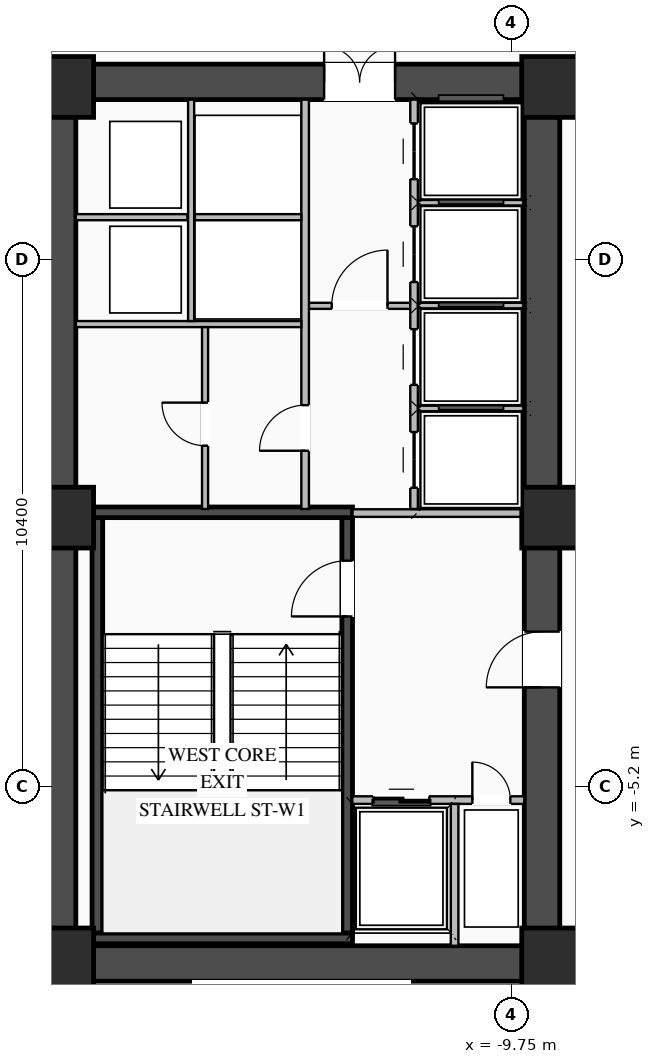
"""IFC4 building model, lengths in metres.
Left out: names, types, materials, properties, quantities, classifications, styles, units other than length and angle.
Written with IfcOpenShell. Run it as: python <this file> out.ifc"""

import sys

from ifc_helpers import new_model, si_unit, direction, frame, frame_2d, origin, origin_2d, place, context, subcontext, project, spatial, rectangle, extrude, element, fill, save


model = new_model("IFC4")
c1 = context("Model", 3, precision=1e-05, world=origin(), true_north=direction((0.0, 1.0)))
c2 = subcontext(c1, "Body", "Model", "MODEL_VIEW")
j1 = project(units=[si_unit("LENGTHUNIT", "METRE"), si_unit("PLANEANGLEUNIT", "RADIAN")], contexts=[c1])
p1 = place(None, origin())
s1 = spatial("IfcSite", under=j1, at=p1, CompositionType="ELEMENT")
p2 = place(p1, origin())
s2 = spatial("IfcBuilding", under=s1, at=p2, CompositionType="ELEMENT")
p3 = place(p2, frame((0.0, 0.0, 18.6)))
s3 = spatial("IfcBuildingStorey", under=s2, at=p3, CompositionType="ELEMENT", Elevation=18.6)
p4 = place(p3, frame((-19.05, -8.7, 0.0), z_axis=(0.0, 0.0, 1.0), x_axis=(1.0, 0.0, 0.0)))
e1 = element("IfcWall", 1, at=p4, inside=s3, PredefinedType="SHEAR", context=c2, shape_type="SweptSolid", body=[
    extrude(rectangle(XDim=10.25, YDim=0.7, at=frame_2d((5.125, 0.0))), origin(), (0.0, 0.0, 1.0), 3.95),
])
p5 = place(p3, frame((-19.05, 8.7, 0.0), z_axis=(0.0, 0.0, 1.0), x_axis=(1.0, 0.0, 0.0)))
e2 = element("IfcWall", 2, at=p5, inside=s3, PredefinedType="SHEAR", context=c2, shape_type="SweptSolid", body=[
    extrude(rectangle(XDim=10.25, YDim=0.7, at=frame_2d((5.125, 0.0))), origin(), (0.0, 0.0, 1.0), 3.95),
])
p6 = place(p5, frame((5.6, 0.0, 0.0)))
e3 = element("IfcOpeningElement", 3, at=p6, cuts=e2, PredefinedType="OPENING", context=c2, shape_type="SweptSolid", body=[
    extrude(rectangle(XDim=1.4, YDim=2.05, at=frame_2d((0.7, 1.025))), frame((0.0, 0.36, 0.0), z_axis=(0.0, -1.0, 0.0), x_axis=(1.0, 0.0, 0.0)), (0.0, 0.0, 1.0), 0.72),
])
p7 = place(p3, frame((-18.7, -8.35, 0.0), z_axis=(0.0, 0.0, 1.0), x_axis=(0.0, 1.0, 0.0)))
e4 = element("IfcWall", 4, at=p7, inside=s3, PredefinedType="SHEAR", context=c2, shape_type="SweptSolid", body=[
    extrude(rectangle(XDim=16.7, YDim=0.7, at=frame_2d((8.35, 0.0))), origin(), (0.0, 0.0, 1.0), 3.95),
])
p8 = place(p3, frame((-9.15, -8.35, 0.0), z_axis=(0.0, 0.0, 1.0), x_axis=(0.0, 1.0, 0.0)))
e5 = element("IfcWall", 5, at=p8, inside=s3, PredefinedType="SHEAR", context=c2, shape_type="SweptSolid", body=[
    extrude(rectangle(XDim=16.7, YDim=0.7, at=frame_2d((8.35, 0.0))), origin(), (0.0, 0.0, 1.0), 3.95),
])
p9 = place(p8, frame((5.1, 0.0, 0.0)))
e6 = element("IfcOpeningElement", 6, at=p9, cuts=e5, PredefinedType="OPENING", context=c2, shape_type="SweptSolid", body=[
    extrude(rectangle(XDim=1.1, YDim=2.08, at=frame_2d((0.55, 1.04))), frame((0.0, 0.36, 0.0), z_axis=(0.0, -1.0, 0.0), x_axis=(1.0, 0.0, 0.0)), (0.0, 0.0, 1.0), 0.72),
])
p10 = place(p3, frame((-12.995, -8.1, 0.0), z_axis=(0.0, 0.0, 1.0), x_axis=(0.0, 1.0, 0.0)))
e7 = element("IfcWall", 7, at=p10, inside=s3, PredefinedType="SHEAR", context=c2, shape_type="SweptSolid", body=[
    extrude(rectangle(XDim=8.2, YDim=0.21, at=frame_2d((4.1, 0.0))), origin(), (0.0, 0.0, 1.0), 3.95),
])
p11 = place(p10, frame((6.25, 0.0, 0.0)))
e8 = element("IfcOpeningElement", 8, at=p11, cuts=e7, PredefinedType="OPENING", context=c2, shape_type="SweptSolid", body=[
    extrude(rectangle(XDim=1.1, YDim=2.15, at=frame_2d((0.55, 1.075))), frame((0.0, 0.115, 0.0), z_axis=(0.0, -1.0, 0.0), x_axis=(1.0, 0.0, 0.0)), (0.0, 0.0, 1.0), 0.23),
])
p12 = place(p3, frame((-17.925, -8.1, 0.0), z_axis=(0.0, 0.0, 1.0), x_axis=(0.0, 1.0, 0.0)))
e9 = element("IfcWall", 9, at=p12, inside=s3, PredefinedType="SHEAR", context=c2, shape_type="SweptSolid", body=[
    extrude(rectangle(XDim=8.2, YDim=0.21, at=frame_2d((4.1, 0.0))), origin(), (0.0, 0.0, 1.0), 3.95),
])
for number, where, z_axis, x_axis in (
    (10, (-18.03, -8.205, 0.0), (0.0, 0.0, 1.0), (1.0, 0.0, 0.0)),
    (11, (-12.89, 0.205, 0.0), (0.0, 0.0, 1.0), (-1.0, 0.0, 0.0)),
):
    element("IfcWall", number, at=place(p3, frame(where, z_axis=z_axis, x_axis=x_axis)), inside=s3, PredefinedType="SHEAR", context=c2, shape_type="SweptSolid", body=[
        extrude(rectangle(XDim=5.14, YDim=0.21, at=frame_2d((2.57, 0.0))), origin(), (0.0, 0.0, 1.0), 3.95),
    ])
for number, where, z_axis, x_axis in (
    (12, (-8.95, -8.6, 0.0), (0.0, 0.0, 1.0), (1.0, 0.0, 0.0)),
    (13, (-8.95, 0.1, 0.0), (0.0, 0.0, 1.0), (1.0, 0.0, 0.0)),
    (14, (-8.95, 8.6, 0.0), (0.0, 0.0, 1.0), (1.0, 0.0, 0.0)),
    (15, (-18.6, -8.6, 0.0), (0.0, 0.0, 1.0), (1.0, 0.0, 0.0)),
    (16, (-18.6, 0.1, 0.0), (0.0, 0.0, 1.0), (1.0, 0.0, 0.0)),
    (17, (-18.6, 8.6, 0.0), (0.0, 0.0, 1.0), (1.0, 0.0, 0.0)),
):
    element("IfcColumn", number, at=place(p3, frame(where, z_axis=z_axis, x_axis=x_axis)), inside=s3, PredefinedType="COLUMN", context=c2, shape_type="SweptSolid", body=[
        extrude(rectangle(XDim=1.2, YDim=1.2, at=origin_2d()), origin(), (0.0, 0.0, 1.0), 4.2),
    ])
p13 = place(p3, frame((-12.895, -5.475, 0.0), z_axis=(0.0, 0.0, 1.0), x_axis=(1.0, 0.0, 0.0)))
e18 = element("IfcWall", 18, at=p13, inside=s3, PredefinedType="STANDARD", context=c2, shape_type="SweptSolid", body=[
    extrude(rectangle(XDim=3.395, YDim=0.15, at=frame_2d((1.698, 0.0))), origin(), (0.0, 0.0, 1.0), 3.93),
])
p14 = place(p13, frame((0.42, 0.0, 0.0)))
e19 = element("IfcOpeningElement", 19, at=p14, cuts=e18, PredefinedType="OPENING", context=c2, shape_type="SweptSolid", body=[
    extrude(rectangle(XDim=1.1, YDim=2.15, at=frame_2d((0.55, 1.075))), frame((0.0, 0.085, 0.0), z_axis=(0.0, -1.0, 0.0), x_axis=(1.0, 0.0, 0.0)), (0.0, 0.0, 1.0), 0.17),
])
p15 = place(p13, frame((2.37, 0.0, 0.0)))
e20 = element("IfcOpeningElement", 20, at=p15, cuts=e18, PredefinedType="OPENING", context=c2, shape_type="SweptSolid", body=[
    extrude(rectangle(XDim=0.75, YDim=2.05, at=frame_2d((0.375, 1.025))), frame((0.0, 0.085, 0.0), z_axis=(0.0, -1.0, 0.0), x_axis=(1.0, 0.0, 0.0)), (0.0, 0.0, 1.0), 0.17),
])
p16 = place(p3, frame((-10.875, -8.35, 0.0), z_axis=(0.0, 0.0, 1.0), x_axis=(0.0, 1.0, 0.0)))
e21 = element("IfcWall", 21, at=p16, inside=s3, PredefinedType="STANDARD", context=c2, shape_type="SweptSolid", body=[
    extrude(rectangle(XDim=2.8, YDim=0.15, at=frame_2d((1.4, 0.0))), origin(), (0.0, 0.0, 1.0), 3.93),
])
p17 = place(p3, frame((-12.89, 0.19, 0.0), z_axis=(0.0, 0.0, 1.0), x_axis=(1.0, 0.0, 0.0)))
e22 = element("IfcWall", 22, at=p17, inside=s3, PredefinedType="STANDARD", context=c2, shape_type="SweptSolid", body=[
    extrude(rectangle(XDim=3.39, YDim=0.15, at=frame_2d((1.695, 0.0))), origin(), (0.0, 0.0, 1.0), 3.225),
])
p18 = place(p3, frame((-13.75, 4.28, 0.0), z_axis=(0.0, 0.0, 1.0), x_axis=(1.0, 0.0, 0.0)))
e23 = element("IfcWall", 23, at=p18, inside=s3, PredefinedType="STANDARD", context=c2, shape_type="SweptSolid", body=[
    extrude(rectangle(XDim=2.0, YDim=0.12, at=frame_2d((1.0, 0.0))), origin(), (0.0, 0.0, 1.0), 3.93),
])
p19 = place(p18, frame((0.45, 0.0, 0.0)))
e24 = element("IfcOpeningElement", 24, at=p19, cuts=e23, PredefinedType="OPENING", context=c2, shape_type="SweptSolid", body=[
    extrude(rectangle(XDim=1.1, YDim=2.1, at=frame_2d((0.55, 1.05))), frame((0.0, 0.07, 0.0), z_axis=(0.0, -1.0, 0.0), x_axis=(1.0, 0.0, 0.0)), (0.0, 0.0, 1.0), 0.14),
])
p20 = place(p3, frame((-11.675, 0.27, 0.0), z_axis=(0.0, 0.0, 1.0), x_axis=(0.0, 1.0, 0.0)))
e25 = element("IfcWall", 25, at=p20, inside=s3, PredefinedType="STANDARD", context=c2, shape_type="SweptSolid", body=[
    extrude(rectangle(XDim=8.08, YDim=0.15, at=frame_2d((4.04, 0.0))), origin(), (0.0, 0.0, 1.0), 3.93),
])
p21 = place(p20, frame((0.42, 0.0, 0.0)))
e26 = element("IfcOpeningElement", 26, at=p21, cuts=e25, PredefinedType="OPENING", context=c2, shape_type="SweptSolid", body=[
    extrude(rectangle(XDim=1.1, YDim=2.1, at=frame_2d((0.55, 1.05))), frame((0.0, 0.085, 0.0), z_axis=(0.0, -1.0, 0.0), x_axis=(1.0, 0.0, 0.0)), (0.0, 0.0, 1.0), 0.17),
])
p22 = place(p20, frame((2.45, 0.0, 0.0)))
e27 = element("IfcOpeningElement", 27, at=p22, cuts=e25, PredefinedType="OPENING", context=c2, shape_type="SweptSolid", body=[
    extrude(rectangle(XDim=1.1, YDim=2.1, at=frame_2d((0.55, 1.05))), frame((0.0, 0.085, 0.0), z_axis=(0.0, -1.0, 0.0), x_axis=(1.0, 0.0, 0.0)), (0.0, 0.0, 1.0), 0.17),
])
p23 = place(p20, frame((4.48, 0.0, 0.0)))
e28 = element("IfcOpeningElement", 28, at=p23, cuts=e25, PredefinedType="OPENING", context=c2, shape_type="SweptSolid", body=[
    extrude(rectangle(XDim=1.1, YDim=2.1, at=frame_2d((0.55, 1.05))), frame((0.0, 0.085, 0.0), z_axis=(0.0, -1.0, 0.0), x_axis=(1.0, 0.0, 0.0)), (0.0, 0.0, 1.0), 0.17),
])
p24 = place(p20, frame((6.51, 0.0, 0.0)))
e29 = element("IfcOpeningElement", 29, at=p24, cuts=e25, PredefinedType="OPENING", context=c2, shape_type="SweptSolid", body=[
    extrude(rectangle(XDim=1.1, YDim=2.1, at=frame_2d((0.55, 1.05))), frame((0.0, 0.085, 0.0), z_axis=(0.0, -1.0, 0.0), x_axis=(1.0, 0.0, 0.0)), (0.0, 0.0, 1.0), 0.17),
])
for number, where, z_axis, x_axis in (
    (30, (-11.6, 2.255, 0.0), (0.0, 0.0, 1.0), (1.0, 0.0, 0.0)),
    (31, (-11.6, 4.285, 0.0), (0.0, 0.0, 1.0), (1.0, 0.0, 0.0)),
    (32, (-11.6, 6.315, 0.0), (0.0, 0.0, 1.0), (1.0, 0.0, 0.0)),
):
    element("IfcWall", number, at=place(p3, frame(where, z_axis=z_axis, x_axis=x_axis)), inside=s3, PredefinedType="STANDARD", context=c2, shape_type="SweptSolid", body=[
        extrude(rectangle(XDim=2.1, YDim=0.11, at=frame_2d((1.05, 0.0))), origin(), (0.0, 0.0, 1.0), 3.93),
    ])
p25 = place(p3, frame((-13.825, 0.27, 0.0), z_axis=(0.0, 0.0, 1.0), x_axis=(0.0, 1.0, 0.0)))
e33 = element("IfcWall", 33, at=p25, inside=s3, PredefinedType="STANDARD", context=c2, shape_type="SweptSolid", body=[
    extrude(rectangle(XDim=8.08, YDim=0.15, at=frame_2d((4.04, 0.0))), origin(), (0.0, 0.0, 1.0), 3.93),
])
p26 = place(p25, frame((1.15, 0.0, 0.0)))
e34 = element("IfcOpeningElement", 34, at=p26, cuts=e33, PredefinedType="OPENING", context=c2, shape_type="SweptSolid", body=[
    extrude(rectangle(XDim=0.9, YDim=2.05, at=frame_2d((0.45, 1.025))), frame((0.0, 0.085, 0.0), z_axis=(0.0, -1.0, 0.0), x_axis=(1.0, 0.0, 0.0)), (0.0, 0.0, 1.0), 0.17),
])
p27 = place(p3, frame((-18.35, 3.92, 0.0), z_axis=(0.0, 0.0, 1.0), x_axis=(1.0, 0.0, 0.0)))
e35 = element("IfcWall", 35, at=p27, inside=s3, PredefinedType="STANDARD", context=c2, shape_type="SweptSolid", body=[
    extrude(rectangle(XDim=4.45, YDim=0.12, at=frame_2d((2.225, 0.0))), origin(), (0.0, 0.0, 1.0), 3.93),
])
p28 = place(p3, frame((-18.35, 6.03, 0.0), z_axis=(0.0, 0.0, 1.0), x_axis=(1.0, 0.0, 0.0)))
e36 = element("IfcWall", 36, at=p28, inside=s3, PredefinedType="STANDARD", context=c2, shape_type="SweptSolid", body=[
    extrude(rectangle(XDim=2.2, YDim=0.12, at=frame_2d((1.1, 0.0))), origin(), (0.0, 0.0, 1.0), 3.93),
])
p29 = place(p3, frame((-16.075, 3.98, 0.0), z_axis=(0.0, 0.0, 1.0), x_axis=(0.0, 1.0, 0.0)))
e37 = element("IfcWall", 37, at=p29, inside=s3, PredefinedType="STANDARD", context=c2, shape_type="SweptSolid", body=[
    extrude(rectangle(XDim=4.37, YDim=0.12, at=frame_2d((2.185, 0.0))), origin(), (0.0, 0.0, 1.0), 3.93),
])
p30 = place(p3, frame((-16.0, 6.03, 0.0), z_axis=(0.0, 0.0, 1.0), x_axis=(1.0, 0.0, 0.0)))
e38 = element("IfcWall", 38, at=p30, inside=s3, PredefinedType="STANDARD", context=c2, shape_type="SweptSolid", body=[
    extrude(rectangle(XDim=2.1, YDim=0.12, at=frame_2d((1.05, 0.0))), origin(), (0.0, 0.0, 1.0), 3.93),
])
p31 = place(p3, frame((-15.8, 0.27, 0.0), z_axis=(0.0, 0.0, 1.0), x_axis=(0.0, 1.0, 0.0)))
e39 = element("IfcWall", 39, at=p31, inside=s3, PredefinedType="STANDARD", context=c2, shape_type="SweptSolid", body=[
    extrude(rectangle(XDim=3.59, YDim=0.12, at=frame_2d((1.795, 0.0))), origin(), (0.0, 0.0, 1.0), 3.93),
])
p32 = place(p31, frame((1.25, 0.0, 0.0)))
e40 = element("IfcOpeningElement", 40, at=p32, cuts=e39, PredefinedType="OPENING", context=c2, shape_type="SweptSolid", body=[
    extrude(rectangle(XDim=0.85, YDim=2.05, at=frame_2d((0.425, 1.025))), frame((0.0, 0.07, 0.0), z_axis=(0.0, -1.0, 0.0), x_axis=(1.0, 0.0, 0.0)), (0.0, 0.0, 1.0), 0.14),
])
p33 = place(p11, origin())
e41 = element("IfcDoor", 41, at=p33, inside=s3, OperationType="SINGLE_SWING_LEFT", PredefinedType="DOOR", context=c2, shape_type="SweptSolid", body=[
    extrude(rectangle(XDim=1.1, YDim=2.15, at=frame_2d((0.55, 1.075))), frame((0.0, 0.025, 0.0), z_axis=(0.0, -1.0, 0.0), x_axis=(1.0, 0.0, 0.0)), (0.0, 0.0, 1.0), 0.05),
])
fill(e8, e41)
p34 = place(p14, origin())
e42 = element("IfcDoor", 42, at=p34, inside=s3, OperationType="DOUBLE_DOOR_SLIDING", PredefinedType="DOOR", context=c2, shape_type="SweptSolid", body=[
    extrude(rectangle(XDim=1.1, YDim=2.15, at=frame_2d((0.55, 1.075))), frame((0.0, 0.025, 0.0), z_axis=(0.0, -1.0, 0.0), x_axis=(1.0, 0.0, 0.0)), (0.0, 0.0, 1.0), 0.05),
])
fill(e19, e42)
p35 = place(p15, origin())
e43 = element("IfcDoor", 43, at=p35, inside=s3, OperationType="SINGLE_SWING_LEFT", PredefinedType="DOOR", context=c2, shape_type="SweptSolid", body=[
    extrude(rectangle(XDim=0.75, YDim=2.05, at=frame_2d((0.375, 1.025))), frame((0.0, 0.025, 0.0), z_axis=(0.0, -1.0, 0.0), x_axis=(1.0, 0.0, 0.0)), (0.0, 0.0, 1.0), 0.05),
])
fill(e20, e43)
p36 = place(p9, origin())
e44 = element("IfcDoor", 44, at=p36, inside=s3, OperationType="SINGLE_SWING_LEFT", PredefinedType="DOOR", context=c2, shape_type="SweptSolid", body=[
    extrude(rectangle(XDim=1.1, YDim=2.08, at=frame_2d((0.55, 1.04))), frame((0.0, 0.305, 0.0), z_axis=(0.0, -1.0, 0.0), x_axis=(1.0, 0.0, 0.0)), (0.0, 0.0, 1.0), 0.05),
])
fill(e6, e44)
p37 = place(p19, origin())
e45 = element("IfcDoor", 45, at=p37, inside=s3, OperationType="SINGLE_SWING_RIGHT", PredefinedType="DOOR", context=c2, shape_type="SweptSolid", body=[
    extrude(rectangle(XDim=1.1, YDim=2.1, at=frame_2d((0.55, 1.05))), frame((0.0, 0.025, 0.0), z_axis=(0.0, -1.0, 0.0), x_axis=(1.0, 0.0, 0.0)), (0.0, 0.0, 1.0), 0.05),
])
fill(e24, e45)
p38 = place(p6, origin())
e46 = element("IfcDoor", 46, at=p38, inside=s3, OperationType="DOUBLE_DOOR_SINGLE_SWING", PredefinedType="DOOR", context=c2, shape_type="SweptSolid", body=[
    extrude(rectangle(XDim=1.4, YDim=2.05, at=frame_2d((0.7, 1.025))), frame((0.0, 0.295, 0.0), z_axis=(0.0, -1.0, 0.0), x_axis=(1.0, 0.0, 0.0)), (0.0, 0.0, 1.0), 0.05),
])
fill(e3, e46)
p39 = place(p21, origin())
e47 = element("IfcDoor", 47, at=p39, inside=s3, OperationType="DOUBLE_DOOR_SLIDING", PredefinedType="DOOR", context=c2, shape_type="SweptSolid", body=[
    extrude(rectangle(XDim=1.1, YDim=2.1, at=frame_2d((0.55, 1.05))), frame((0.0, 0.025, 0.0), z_axis=(0.0, -1.0, 0.0), x_axis=(1.0, 0.0, 0.0)), (0.0, 0.0, 1.0), 0.05),
])
fill(e26, e47)
p40 = place(p22, origin())
e48 = element("IfcDoor", 48, at=p40, inside=s3, OperationType="DOUBLE_DOOR_SLIDING", PredefinedType="DOOR", context=c2, shape_type="SweptSolid", body=[
    extrude(rectangle(XDim=1.1, YDim=2.1, at=frame_2d((0.55, 1.05))), frame((0.0, 0.025, 0.0), z_axis=(0.0, -1.0, 0.0), x_axis=(1.0, 0.0, 0.0)), (0.0, 0.0, 1.0), 0.05),
])
fill(e27, e48)
p41 = place(p23, origin())
e49 = element("IfcDoor", 49, at=p41, inside=s3, OperationType="DOUBLE_DOOR_SLIDING", PredefinedType="DOOR", context=c2, shape_type="SweptSolid", body=[
    extrude(rectangle(XDim=1.1, YDim=2.1, at=frame_2d((0.55, 1.05))), frame((0.0, 0.025, 0.0), z_axis=(0.0, -1.0, 0.0), x_axis=(1.0, 0.0, 0.0)), (0.0, 0.0, 1.0), 0.05),
])
fill(e28, e49)
p42 = place(p24, origin())
e50 = element("IfcDoor", 50, at=p42, inside=s3, OperationType="DOUBLE_DOOR_SLIDING", PredefinedType="DOOR", context=c2, shape_type="SweptSolid", body=[
    extrude(rectangle(XDim=1.1, YDim=2.1, at=frame_2d((0.55, 1.05))), frame((0.0, 0.025, 0.0), z_axis=(0.0, -1.0, 0.0), x_axis=(1.0, 0.0, 0.0)), (0.0, 0.0, 1.0), 0.05),
])
fill(e29, e50)
p43 = place(p26, origin())
e51 = element("IfcDoor", 51, at=p43, inside=s3, OperationType="SINGLE_SWING_LEFT", PredefinedType="DOOR", context=c2, shape_type="SweptSolid", body=[
    extrude(rectangle(XDim=0.9, YDim=2.05, at=frame_2d((0.45, 1.025))), frame((0.0, 0.025, 0.0), z_axis=(0.0, -1.0, 0.0), x_axis=(1.0, 0.0, 0.0)), (0.0, 0.0, 1.0), 0.05),
])
fill(e34, e51)
p44 = place(p32, origin())
e52 = element("IfcDoor", 52, at=p44, inside=s3, OperationType="SINGLE_SWING_RIGHT", PredefinedType="DOOR", context=c2, shape_type="SweptSolid", body=[
    extrude(rectangle(XDim=0.85, YDim=2.05, at=frame_2d((0.425, 1.025))), frame((0.0, 0.025, 0.0), z_axis=(0.0, -1.0, 0.0), x_axis=(1.0, 0.0, 0.0)), (0.0, 0.0, 1.0), 0.05),
])
fill(e40, e52)
save(model, sys.argv[1])
